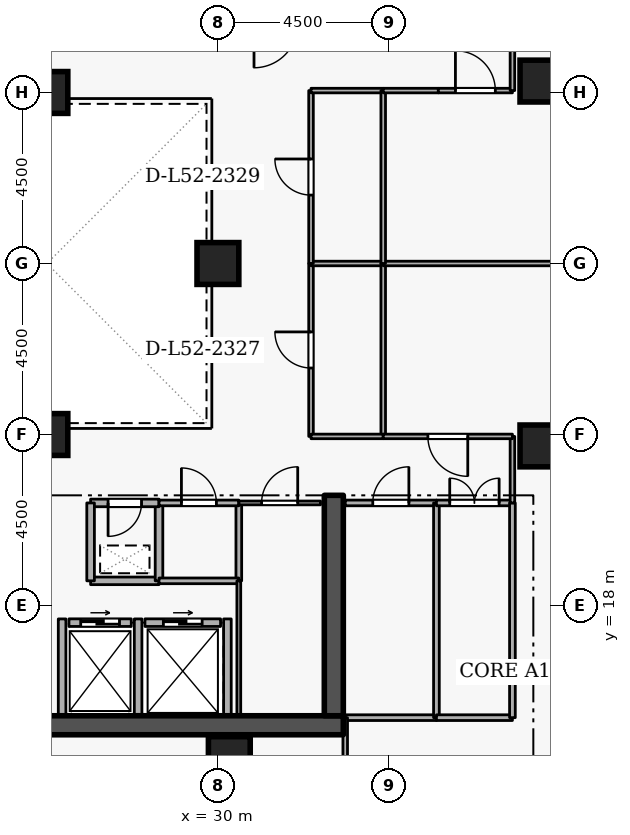
"""IFC4 building model, lengths in metres.
Left out: names, types, materials, properties, quantities, classifications, styles, units other than length and angle.
Written with IfcOpenShell. Run it as: python <this file> out.ifc"""

import sys

from ifc_helpers import new_model, si_unit, direction, frame, frame_2d, origin, origin_2d, place, context, subcontext, project, spatial, rectangle, extrude, element, fill, save


model = new_model("IFC4")
c1 = context("Model", 3, precision=1e-05, world=origin(), true_north=direction((0.0, 1.0)))
c2 = subcontext(c1, "Body", "Model", "MODEL_VIEW")
j1 = project(units=[si_unit("LENGTHUNIT", "METRE"), si_unit("PLANEANGLEUNIT", "RADIAN")], contexts=[c1])
p1 = place(None, origin())
s1 = spatial("IfcSite", under=j1, at=p1, CompositionType="ELEMENT")
p2 = place(p1, origin())
s2 = spatial("IfcBuilding", under=s1, at=p2, CompositionType="ELEMENT")
p3 = place(p2, frame((0.0, 0.0, 196.5)))
s3 = spatial("IfcBuildingStorey", under=s2, at=p3, CompositionType="ELEMENT", Elevation=196.5)
p4 = place(p3, frame((17.7, 14.85, 0.0), z_axis=(0.0, 0.0, 1.0), x_axis=(1.0, 0.0, 0.0)))
e1 = element("IfcWall", 1, at=p4, inside=s3, PredefinedType="SHEAR", context=c2, shape_type="SweptSolid", body=[
    extrude(rectangle(XDim=15.6, YDim=0.5, at=frame_2d((7.8, 0.0))), origin(), (0.0, 0.0, 1.0), 3.6),
])
p5 = place(p3, frame((33.05, 15.1, 0.0), z_axis=(0.0, 0.0, 1.0), x_axis=(0.0, 1.0, 0.0)))
e2 = element("IfcWall", 2, at=p5, inside=s3, PredefinedType="SHEAR", context=c2, shape_type="SweptSolid", body=[
    extrude(rectangle(XDim=5.8, YDim=0.5, at=frame_2d((2.9, 0.0))), origin(), (0.0, 0.0, 1.0), 3.6),
])
for number, where, z_axis, x_axis in (
    (3, (38.5, 22.2, 0.0), (0.0, 0.0, 1.0), (1.0, 0.0, 0.0)),
    (4, (38.5, 31.8, 0.0), (0.0, 0.0, 1.0), (1.0, 0.0, 0.0)),
    (5, (30.3, 14.0, 0.0), (0.0, 0.0, 1.0), (1.0, 0.0, 0.0)),
    (6, (25.5, 22.5, 0.0), (0.0, 0.0, 1.0), (1.0, 0.0, 0.0)),
    (7, (25.5, 31.5, 0.0), (0.0, 0.0, 1.0), (1.0, 0.0, 0.0)),
    (8, (30.0, 27.0, 0.0), (0.0, 0.0, 1.0), (1.0, 0.0, 0.0)),
):
    element("IfcColumn", number, at=place(p3, frame(where, z_axis=z_axis, x_axis=x_axis)), inside=s3, PredefinedType="COLUMN", context=c2, shape_type="SweptSolid", body=[
        extrude(rectangle(XDim=1.1, YDim=1.1, at=origin_2d()), origin(), (0.0, 0.0, 1.0), 3.6),
    ])
p6 = place(p3, frame((26.08, 17.55, 0.0), z_axis=(0.0, 0.0, 1.0), x_axis=(1.0, 0.0, 0.0)))
e9 = element("IfcWall", 9, at=p6, inside=s3, PredefinedType="STANDARD", context=c2, shape_type="SweptSolid", body=[
    extrude(rectangle(XDim=1.64, YDim=0.2, at=frame_2d((0.82, 0.0))), origin(), (0.0, 0.0, 1.0), 3.32),
])
p7 = place(p6, frame((0.31, 0.0, 0.0)))
e10 = element("IfcOpeningElement", 10, at=p7, cuts=e9, PredefinedType="OPENING", context=c2, shape_type="SweptSolid", body=[
    extrude(rectangle(XDim=1.02, YDim=2.06, at=frame_2d((0.51, 1.03))), frame((0.0, 0.11, 0.0), z_axis=(0.0, -1.0, 0.0), x_axis=(1.0, 0.0, 0.0)), (0.0, 0.0, 1.0), 0.22),
])
p8 = place(p3, frame((28.08, 17.55, 0.0), z_axis=(0.0, 0.0, 1.0), x_axis=(1.0, 0.0, 0.0)))
e11 = element("IfcWall", 11, at=p8, inside=s3, PredefinedType="STANDARD", context=c2, shape_type="SweptSolid", body=[
    extrude(rectangle(XDim=1.99, YDim=0.2, at=frame_2d((0.995, 0.0))), origin(), (0.0, 0.0, 1.0), 3.32),
])
p9 = place(p8, frame((0.485, 0.0, 0.0)))
e12 = element("IfcOpeningElement", 12, at=p9, cuts=e11, PredefinedType="OPENING", context=c2, shape_type="SweptSolid", body=[
    extrude(rectangle(XDim=1.02, YDim=2.06, at=frame_2d((0.51, 1.03))), frame((0.0, 0.11, 0.0), z_axis=(0.0, -1.0, 0.0), x_axis=(1.0, 0.0, 0.0)), (0.0, 0.0, 1.0), 0.22),
])
for number, where, z_axis, x_axis in (
    (13, (27.9, 15.112, 0.0), (0.0, 0.0, 1.0), (0.0, 1.0, 0.0)),
    (14, (25.9, 15.112, 0.0), (0.0, 0.0, 1.0), (0.0, 1.0, 0.0)),
    (15, (30.25, 15.112, 0.0), (0.0, 0.0, 1.0), (0.0, 1.0, 0.0)),
):
    element("IfcWall", number, at=place(p3, frame(where, z_axis=z_axis, x_axis=x_axis)), inside=s3, PredefinedType="STANDARD", context=c2, shape_type="SweptSolid", body=[
        extrude(rectangle(XDim=2.536, YDim=0.2, at=frame_2d((1.268, 0.0))), origin(), (0.0, 0.0, 1.0), 3.32),
    ])
p10 = place(p3, frame((26.65, 18.65, 0.0), z_axis=(0.0, 0.0, 1.0), x_axis=(1.0, 0.0, 0.0)))
e16 = element("IfcWall", 16, at=p10, inside=s3, PredefinedType="STANDARD", context=c2, shape_type="SweptSolid", body=[
    extrude(rectangle(XDim=1.8, YDim=0.2, at=frame_2d((0.9, 0.0))), origin(), (0.0, 0.0, 1.0), 3.32),
])
p11 = place(p3, frame((28.45, 18.65, 0.0), z_axis=(0.0, 0.0, 1.0), x_axis=(0.0, 1.0, 0.0)))
e17 = element("IfcWall", 17, at=p11, inside=s3, PredefinedType="STANDARD", context=c2, shape_type="SweptSolid", body=[
    extrude(rectangle(XDim=2.05, YDim=0.2, at=frame_2d((1.025, 0.0))), origin(), (0.0, 0.0, 1.0), 3.32),
])
p12 = place(p3, frame((28.45, 20.7, 0.0), z_axis=(0.0, 0.0, 1.0), x_axis=(-1.0, 0.0, 0.0)))
e18 = element("IfcWall", 18, at=p12, inside=s3, PredefinedType="STANDARD", context=c2, shape_type="SweptSolid", body=[
    extrude(rectangle(XDim=1.8, YDim=0.2, at=frame_2d((0.9, 0.0))), origin(), (0.0, 0.0, 1.0), 3.32),
])
p13 = place(p12, frame((0.46, 0.0, 0.0)))
e19 = element("IfcOpeningElement", 19, at=p13, cuts=e18, PredefinedType="OPENING", context=c2, shape_type="SweptSolid", body=[
    extrude(rectangle(XDim=0.88, YDim=2.04, at=frame_2d((0.44, 1.02))), frame((0.0, 0.11, 0.0), z_axis=(0.0, -1.0, 0.0), x_axis=(1.0, 0.0, 0.0)), (0.0, 0.0, 1.0), 0.22),
])
p14 = place(p3, frame((26.65, 20.7, 0.0), z_axis=(0.0, 0.0, 1.0), x_axis=(0.0, -1.0, 0.0)))
e20 = element("IfcWall", 20, at=p14, inside=s3, PredefinedType="STANDARD", context=c2, shape_type="SweptSolid", body=[
    extrude(rectangle(XDim=2.05, YDim=0.2, at=frame_2d((1.025, 0.0))), origin(), (0.0, 0.0, 1.0), 3.32),
])
p15 = place(p3, frame((30.55, 20.7, 0.0), z_axis=(0.0, 0.0, 1.0), x_axis=(0.0, -1.0, 0.0)))
e21 = element("IfcWall", 21, at=p15, inside=s3, PredefinedType="PARTITIONING", context=c2, shape_type="SweptSolid", body=[
    extrude(rectangle(XDim=2.05, YDim=0.15, at=frame_2d((1.025, 0.0))), origin(), (0.0, 0.0, 1.0), 3.32),
])
p16 = place(p3, frame((30.55, 18.65, 0.0), z_axis=(0.0, 0.0, 1.0), x_axis=(-1.0, 0.0, 0.0)))
e22 = element("IfcWall", 22, at=p16, inside=s3, PredefinedType="PARTITIONING", context=c2, shape_type="SweptSolid", body=[
    extrude(rectangle(XDim=2.1, YDim=0.15, at=frame_2d((1.05, 0.0))), origin(), (0.0, 0.0, 1.0), 3.32),
])
p17 = place(p3, frame((28.45, 20.7, 0.0), z_axis=(0.0, 0.0, 1.0), x_axis=(1.0, 0.0, 0.0)))
e23 = element("IfcWall", 23, at=p17, inside=s3, PredefinedType="PARTITIONING", context=c2, shape_type="SweptSolid", body=[
    extrude(rectangle(XDim=2.1, YDim=0.15, at=frame_2d((1.05, 0.0))), origin(), (0.0, 0.0, 1.0), 3.32),
])
p18 = place(p17, frame((0.59, 0.0, 0.0)))
e24 = element("IfcOpeningElement", 24, at=p18, cuts=e23, PredefinedType="OPENING", context=c2, shape_type="SweptSolid", body=[
    extrude(rectangle(XDim=0.92, YDim=2.08, at=frame_2d((0.46, 1.04))), frame((0.0, 0.085, 0.0), z_axis=(0.0, -1.0, 0.0), x_axis=(1.0, 0.0, 0.0)), (0.0, 0.0, 1.0), 0.17),
])
p19 = place(p3, frame((30.55, 15.1, 0.0), z_axis=(0.0, 0.0, 1.0), x_axis=(0.0, 1.0, 0.0)))
e25 = element("IfcWall", 25, at=p19, inside=s3, PredefinedType="PARTITIONING", context=c2, shape_type="SweptSolid", body=[
    extrude(rectangle(XDim=3.55, YDim=0.1, at=frame_2d((1.775, 0.0))), origin(), (0.0, 0.0, 1.0), 3.32),
])
p20 = place(p3, frame((30.55, 20.7, 0.0), z_axis=(0.0, 0.0, 1.0), x_axis=(1.0, 0.0, 0.0)))
e26 = element("IfcWall", 26, at=p20, inside=s3, PredefinedType="PARTITIONING", context=c2, shape_type="SweptSolid", body=[
    extrude(rectangle(XDim=2.15, YDim=0.1, at=frame_2d((1.075, 0.0))), origin(), (0.0, 0.0, 1.0), 3.32),
])
p21 = place(p20, frame((0.6, 0.0, 0.0)))
e27 = element("IfcOpeningElement", 27, at=p21, cuts=e26, PredefinedType="OPENING", context=c2, shape_type="SweptSolid", body=[
    extrude(rectangle(XDim=0.95, YDim=2.1, at=frame_2d((0.475, 1.05))), frame((0.0, 0.06, 0.0), z_axis=(0.0, -1.0, 0.0), x_axis=(1.0, 0.0, 0.0)), (0.0, 0.0, 1.0), 0.12),
])
p22 = place(p3, frame((35.75, 15.05, 0.0), z_axis=(0.0, 0.0, 1.0), x_axis=(-1.0, 0.0, 0.0)))
e28 = element("IfcWall", 28, at=p22, inside=s3, PredefinedType="PARTITIONING", context=c2, shape_type="SweptSolid", body=[
    extrude(rectangle(XDim=2.4, YDim=0.15, at=frame_2d((1.2, 0.0))), origin(), (0.0, 0.0, 1.0), 3.32),
])
p23 = place(p3, frame((33.35, 20.7, 0.0), z_axis=(0.0, 0.0, 1.0), x_axis=(1.0, 0.0, 0.0)))
e29 = element("IfcWall", 29, at=p23, inside=s3, PredefinedType="PARTITIONING", context=c2, shape_type="SweptSolid", body=[
    extrude(rectangle(XDim=2.4, YDim=0.15, at=frame_2d((1.2, 0.0))), origin(), (0.0, 0.0, 1.0), 3.32),
])
p24 = place(p23, frame((0.725, 0.0, 0.0)))
e30 = element("IfcOpeningElement", 30, at=p24, cuts=e29, PredefinedType="OPENING", context=c2, shape_type="SweptSolid", body=[
    extrude(rectangle(XDim=0.95, YDim=2.1, at=frame_2d((0.475, 1.05))), frame((0.0, 0.085, 0.0), z_axis=(0.0, -1.0, 0.0), x_axis=(1.0, 0.0, 0.0)), (0.0, 0.0, 1.0), 0.17),
])
p25 = place(p3, frame((35.75, 20.7, 0.0), z_axis=(0.0, 0.0, 1.0), x_axis=(0.0, -1.0, 0.0)))
e31 = element("IfcWall", 31, at=p25, inside=s3, PredefinedType="PARTITIONING", context=c2, shape_type="SweptSolid", body=[
    extrude(rectangle(XDim=5.65, YDim=0.15, at=frame_2d((2.825, 0.0))), origin(), (0.0, 0.0, 1.0), 3.32),
])
p26 = place(p3, frame((37.75, 15.05, 0.0), z_axis=(0.0, 0.0, 1.0), x_axis=(-1.0, 0.0, 0.0)))
e32 = element("IfcWall", 32, at=p26, inside=s3, PredefinedType="PARTITIONING", context=c2, shape_type="SweptSolid", body=[
    extrude(rectangle(XDim=2.0, YDim=0.15, at=frame_2d((1.0, 0.0))), origin(), (0.0, 0.0, 1.0), 3.32),
])
p27 = place(p3, frame((35.75, 20.7, 0.0), z_axis=(0.0, 0.0, 1.0), x_axis=(1.0, 0.0, 0.0)))
e33 = element("IfcWall", 33, at=p27, inside=s3, PredefinedType="PARTITIONING", context=c2, shape_type="SweptSolid", body=[
    extrude(rectangle(XDim=2.0, YDim=0.15, at=frame_2d((1.0, 0.0))), origin(), (0.0, 0.0, 1.0), 3.32),
])
p28 = place(p27, frame((0.35, 0.0, 0.0)))
e34 = element("IfcOpeningElement", 34, at=p28, cuts=e33, PredefinedType="OPENING", context=c2, shape_type="SweptSolid", body=[
    extrude(rectangle(XDim=1.3, YDim=2.12, at=frame_2d((0.65, 1.06))), frame((0.0, 0.085, 0.0), z_axis=(0.0, -1.0, 0.0), x_axis=(1.0, 0.0, 0.0)), (0.0, 0.0, 1.0), 0.17),
])
p29 = place(p3, frame((37.75, 20.7, 0.0), z_axis=(0.0, 0.0, 1.0), x_axis=(0.0, -1.0, 0.0)))
e35 = element("IfcWall", 35, at=p29, inside=s3, PredefinedType="PARTITIONING", context=c2, shape_type="SweptSolid", body=[
    extrude(rectangle(XDim=5.65, YDim=0.15, at=frame_2d((2.825, 0.0))), origin(), (0.0, 0.0, 1.0), 3.32),
])
p30 = place(p3, frame((32.45, 22.45, 0.0), z_axis=(0.0, 0.0, 1.0), x_axis=(0.0, 1.0, 0.0)))
e36 = element("IfcWall", 36, at=p30, inside=s3, PredefinedType="PARTITIONING", context=c2, shape_type="SweptSolid", body=[
    extrude(rectangle(XDim=4.55, YDim=0.12, at=frame_2d((2.275, 0.0))), origin(), (0.0, 0.0, 1.0), 3.32),
])
p31 = place(p30, frame((1.8, 0.0, 0.0)))
e37 = element("IfcOpeningElement", 37, at=p31, cuts=e36, PredefinedType="OPENING", context=c2, shape_type="SweptSolid", body=[
    extrude(rectangle(XDim=0.95, YDim=2.1, at=frame_2d((0.475, 1.05))), frame((0.0, 0.07, 0.0), z_axis=(0.0, -1.0, 0.0), x_axis=(1.0, 0.0, 0.0)), (0.0, 0.0, 1.0), 0.14),
])
p32 = place(p3, frame((32.45, 27.0, 0.0), z_axis=(0.0, 0.0, 1.0), x_axis=(1.0, 0.0, 0.0)))
e38 = element("IfcWall", 38, at=p32, inside=s3, PredefinedType="PARTITIONING", context=c2, shape_type="SweptSolid", body=[
    extrude(rectangle(XDim=1.9, YDim=0.12, at=frame_2d((0.95, 0.0))), origin(), (0.0, 0.0, 1.0), 3.32),
])
p33 = place(p3, frame((34.35, 27.0, 0.0), z_axis=(0.0, 0.0, 1.0), x_axis=(0.0, -1.0, 0.0)))
e39 = element("IfcWall", 39, at=p33, inside=s3, PredefinedType="PARTITIONING", context=c2, shape_type="SweptSolid", body=[
    extrude(rectangle(XDim=4.55, YDim=0.12, at=frame_2d((2.275, 0.0))), origin(), (0.0, 0.0, 1.0), 3.32),
])
p34 = place(p3, frame((34.35, 22.45, 0.0), z_axis=(0.0, 0.0, 1.0), x_axis=(-1.0, 0.0, 0.0)))
e40 = element("IfcWall", 40, at=p34, inside=s3, PredefinedType="PARTITIONING", context=c2, shape_type="SweptSolid", body=[
    extrude(rectangle(XDim=1.9, YDim=0.12, at=frame_2d((0.95, 0.0))), origin(), (0.0, 0.0, 1.0), 3.32),
])
p35 = place(p3, frame((37.75, 20.7, 0.0), z_axis=(0.0, 0.0, 1.0), x_axis=(0.0, 1.0, 0.0)))
e41 = element("IfcWall", 41, at=p35, inside=s3, PredefinedType="PARTITIONING", context=c2, shape_type="SweptSolid", body=[
    extrude(rectangle(XDim=1.75, YDim=0.12, at=frame_2d((0.875, 0.0))), origin(), (0.0, 0.0, 1.0), 3.32),
])
p36 = place(p3, frame((37.75, 22.45, 0.0), z_axis=(0.0, 0.0, 1.0), x_axis=(-1.0, 0.0, 0.0)))
e42 = element("IfcWall", 42, at=p36, inside=s3, PredefinedType="PARTITIONING", context=c2, shape_type="SweptSolid", body=[
    extrude(rectangle(XDim=3.4, YDim=0.12, at=frame_2d((1.7, 0.0))), origin(), (0.0, 0.0, 1.0), 3.32),
])
p37 = place(p36, frame((1.175, 0.0, 0.0)))
e43 = element("IfcOpeningElement", 43, at=p37, cuts=e42, PredefinedType="OPENING", context=c2, shape_type="SweptSolid", body=[
    extrude(rectangle(XDim=1.05, YDim=2.1, at=frame_2d((0.525, 1.05))), frame((0.0, 0.07, 0.0), z_axis=(0.0, -1.0, 0.0), x_axis=(1.0, 0.0, 0.0)), (0.0, 0.0, 1.0), 0.14),
])
p38 = place(p3, frame((34.35, 27.0, 0.0), z_axis=(0.0, 0.0, 1.0), x_axis=(1.0, 0.0, 0.0)))
e44 = element("IfcWall", 44, at=p38, inside=s3, PredefinedType="PARTITIONING", context=c2, shape_type="SweptSolid", body=[
    extrude(rectangle(XDim=14.87, YDim=0.12, at=frame_2d((7.435, 0.0))), origin(), (0.0, 0.0, 1.0), 2.862),
])
p39 = place(p3, frame((33.35, 9.28, 0.0), z_axis=(0.0, 0.0, 1.0), x_axis=(0.0, 1.0, 0.0)))
e45 = element("IfcWall", 45, at=p39, inside=s3, PredefinedType="PARTITIONING", context=c2, shape_type="SweptSolid", body=[
    extrude(rectangle(XDim=5.77, YDim=0.12, at=frame_2d((2.885, 0.0))), origin(), (0.0, 0.0, 1.0), 2.525),
])
p40 = place(p3, frame((32.45, 27.0, 0.0), z_axis=(0.0, 0.0, 1.0), x_axis=(0.0, 1.0, 0.0)))
e46 = element("IfcWall", 46, at=p40, inside=s3, PredefinedType="PARTITIONING", context=c2, shape_type="SweptSolid", body=[
    extrude(rectangle(XDim=4.55, YDim=0.12, at=frame_2d((2.275, 0.0))), origin(), (0.0, 0.0, 1.0), 3.32),
])
p41 = place(p40, frame((1.8, 0.0, 0.0)))
e47 = element("IfcOpeningElement", 47, at=p41, cuts=e46, PredefinedType="OPENING", context=c2, shape_type="SweptSolid", body=[
    extrude(rectangle(XDim=0.95, YDim=2.1, at=frame_2d((0.475, 1.05))), frame((0.0, 0.07, 0.0), z_axis=(0.0, -1.0, 0.0), x_axis=(1.0, 0.0, 0.0)), (0.0, 0.0, 1.0), 0.14),
])
p42 = place(p3, frame((32.45, 31.55, 0.0), z_axis=(0.0, 0.0, 1.0), x_axis=(1.0, 0.0, 0.0)))
e48 = element("IfcWall", 48, at=p42, inside=s3, PredefinedType="PARTITIONING", context=c2, shape_type="SweptSolid", body=[
    extrude(rectangle(XDim=1.9, YDim=0.12, at=frame_2d((0.95, 0.0))), origin(), (0.0, 0.0, 1.0), 3.32),
])
p43 = place(p3, frame((34.35, 31.55, 0.0), z_axis=(0.0, 0.0, 1.0), x_axis=(0.0, -1.0, 0.0)))
e49 = element("IfcWall", 49, at=p43, inside=s3, PredefinedType="PARTITIONING", context=c2, shape_type="SweptSolid", body=[
    extrude(rectangle(XDim=4.55, YDim=0.12, at=frame_2d((2.275, 0.0))), origin(), (0.0, 0.0, 1.0), 3.32),
])
p44 = place(p3, frame((34.35, 31.55, 0.0), z_axis=(0.0, 0.0, 1.0), x_axis=(1.0, 0.0, 0.0)))
e50 = element("IfcWall", 50, at=p44, inside=s3, PredefinedType="PARTITIONING", context=c2, shape_type="SweptSolid", body=[
    extrude(rectangle(XDim=1.45, YDim=0.12, at=frame_2d((0.725, 0.0))), origin(), (0.0, 0.0, 1.0), 3.32),
])
p45 = place(p3, frame((35.8, 31.55, 0.0), z_axis=(0.0, 0.0, 1.0), x_axis=(1.0, 0.0, 0.0)))
e51 = element("IfcWall", 51, at=p45, inside=s3, PredefinedType="PARTITIONING", context=c2, shape_type="SweptSolid", body=[
    extrude(rectangle(XDim=1.95, YDim=0.12, at=frame_2d((0.975, 0.0))), origin(), (0.0, 0.0, 1.0), 3.32),
])
p46 = place(p45, frame((0.45, 0.0, 0.0)))
e52 = element("IfcOpeningElement", 52, at=p46, cuts=e51, PredefinedType="OPENING", context=c2, shape_type="SweptSolid", body=[
    extrude(rectangle(XDim=1.05, YDim=2.1, at=frame_2d((0.525, 1.05))), frame((0.0, 0.07, 0.0), z_axis=(0.0, -1.0, 0.0), x_axis=(1.0, 0.0, 0.0)), (0.0, 0.0, 1.0), 0.14),
])
p47 = place(p3, frame((37.75, 31.55, 0.0), z_axis=(0.0, 0.0, 1.0), x_axis=(0.0, 1.0, 0.0)))
e53 = element("IfcWall", 53, at=p47, inside=s3, PredefinedType="PARTITIONING", context=c2, shape_type="SweptSolid", body=[
    extrude(rectangle(XDim=1.75, YDim=0.12, at=frame_2d((0.875, 0.0))), origin(), (0.0, 0.0, 1.0), 3.32),
])
p48 = place(p7, origin())
e54 = element("IfcDoor", 54, at=p48, inside=s3, OperationType="SLIDING_TO_LEFT", PredefinedType="DOOR", context=c2, shape_type="SweptSolid", body=[
    extrude(rectangle(XDim=1.02, YDim=2.06, at=frame_2d((0.51, 1.03))), frame((0.0, 0.025, 0.0), z_axis=(0.0, -1.0, 0.0), x_axis=(1.0, 0.0, 0.0)), (0.0, 0.0, 1.0), 0.05),
])
fill(e10, e54)
p49 = place(p9, origin())
e55 = element("IfcDoor", 55, at=p49, inside=s3, OperationType="SLIDING_TO_LEFT", PredefinedType="DOOR", context=c2, shape_type="SweptSolid", body=[
    extrude(rectangle(XDim=1.02, YDim=2.06, at=frame_2d((0.51, 1.03))), frame((0.0, 0.025, 0.0), z_axis=(0.0, -1.0, 0.0), x_axis=(1.0, 0.0, 0.0)), (0.0, 0.0, 1.0), 0.05),
])
fill(e12, e55)
p50 = place(p13, origin())
e56 = element("IfcDoor", 56, at=p50, inside=s3, OperationType="SINGLE_SWING_RIGHT", PredefinedType="DOOR", context=c2, shape_type="SweptSolid", body=[
    extrude(rectangle(XDim=0.88, YDim=2.04, at=frame_2d((0.44, 1.02))), frame((0.0, 0.025, 0.0), z_axis=(0.0, -1.0, 0.0), x_axis=(1.0, 0.0, 0.0)), (0.0, 0.0, 1.0), 0.05),
])
fill(e19, e56)
p51 = place(p18, origin())
e57 = element("IfcDoor", 57, at=p51, inside=s3, OperationType="SINGLE_SWING_LEFT", PredefinedType="DOOR", context=c2, shape_type="SweptSolid", body=[
    extrude(rectangle(XDim=0.92, YDim=2.08, at=frame_2d((0.46, 1.04))), frame((0.0, 0.025, 0.0), z_axis=(0.0, -1.0, 0.0), x_axis=(1.0, 0.0, 0.0)), (0.0, 0.0, 1.0), 0.05),
])
fill(e24, e57)
p52 = place(p21, origin())
e58 = element("IfcDoor", 58, at=p52, inside=s3, OperationType="SINGLE_SWING_RIGHT", PredefinedType="DOOR", context=c2, shape_type="SweptSolid", body=[
    extrude(rectangle(XDim=0.95, YDim=2.1, at=frame_2d((0.475, 1.05))), frame((0.0, 0.025, 0.0), z_axis=(0.0, -1.0, 0.0), x_axis=(1.0, 0.0, 0.0)), (0.0, 0.0, 1.0), 0.05),
])
fill(e27, e58)
p53 = place(p24, origin())
e59 = element("IfcDoor", 59, at=p53, inside=s3, OperationType="SINGLE_SWING_RIGHT", PredefinedType="DOOR", context=c2, shape_type="SweptSolid", body=[
    extrude(rectangle(XDim=0.95, YDim=2.1, at=frame_2d((0.475, 1.05))), frame((0.0, 0.025, 0.0), z_axis=(0.0, -1.0, 0.0), x_axis=(1.0, 0.0, 0.0)), (0.0, 0.0, 1.0), 0.05),
])
fill(e30, e59)
p54 = place(p28, origin())
e60 = element("IfcDoor", 60, at=p54, inside=s3, OperationType="DOUBLE_DOOR_SINGLE_SWING", PredefinedType="DOOR", context=c2, shape_type="SweptSolid", body=[
    extrude(rectangle(XDim=1.3, YDim=2.12, at=frame_2d((0.65, 1.06))), frame((0.0, 0.025, 0.0), z_axis=(0.0, -1.0, 0.0), x_axis=(1.0, 0.0, 0.0)), (0.0, 0.0, 1.0), 0.05),
])
fill(e34, e60)
p55 = place(p31, origin())
e61 = element("IfcDoor", 61, at=p55, inside=s3, OperationType="SINGLE_SWING_RIGHT", PredefinedType="DOOR", context=c2, shape_type="SweptSolid", body=[
    extrude(rectangle(XDim=0.95, YDim=2.1, at=frame_2d((0.475, 1.05))), frame((0.0, 0.025, 0.0), z_axis=(0.0, -1.0, 0.0), x_axis=(1.0, 0.0, 0.0)), (0.0, 0.0, 1.0), 0.05),
])
fill(e37, e61)
p56 = place(p37, origin())
e62 = element("IfcDoor", 62, at=p56, inside=s3, OperationType="SINGLE_SWING_LEFT", PredefinedType="DOOR", context=c2, shape_type="SweptSolid", body=[
    extrude(rectangle(XDim=1.05, YDim=2.1, at=frame_2d((0.525, 1.05))), frame((0.0, 0.025, 0.0), z_axis=(0.0, -1.0, 0.0), x_axis=(1.0, 0.0, 0.0)), (0.0, 0.0, 1.0), 0.05),
])
fill(e43, e62)
p57 = place(p41, origin())
e63 = element("IfcDoor", 63, at=p57, inside=s3, OperationType="SINGLE_SWING_RIGHT", PredefinedType="DOOR", context=c2, shape_type="SweptSolid", body=[
    extrude(rectangle(XDim=0.95, YDim=2.1, at=frame_2d((0.475, 1.05))), frame((0.0, 0.025, 0.0), z_axis=(0.0, -1.0, 0.0), x_axis=(1.0, 0.0, 0.0)), (0.0, 0.0, 1.0), 0.05),
])
fill(e47, e63)
p58 = place(p46, origin())
e64 = element("IfcDoor", 64, at=p58, inside=s3, OperationType="SINGLE_SWING_LEFT", PredefinedType="DOOR", context=c2, shape_type="SweptSolid", body=[
    extrude(rectangle(XDim=1.05, YDim=2.1, at=frame_2d((0.525, 1.05))), frame((0.0, 0.025, 0.0), z_axis=(0.0, -1.0, 0.0), x_axis=(1.0, 0.0, 0.0)), (0.0, 0.0, 1.0), 0.05),
])
fill(e52, e64)
save(model, sys.argv[1])
